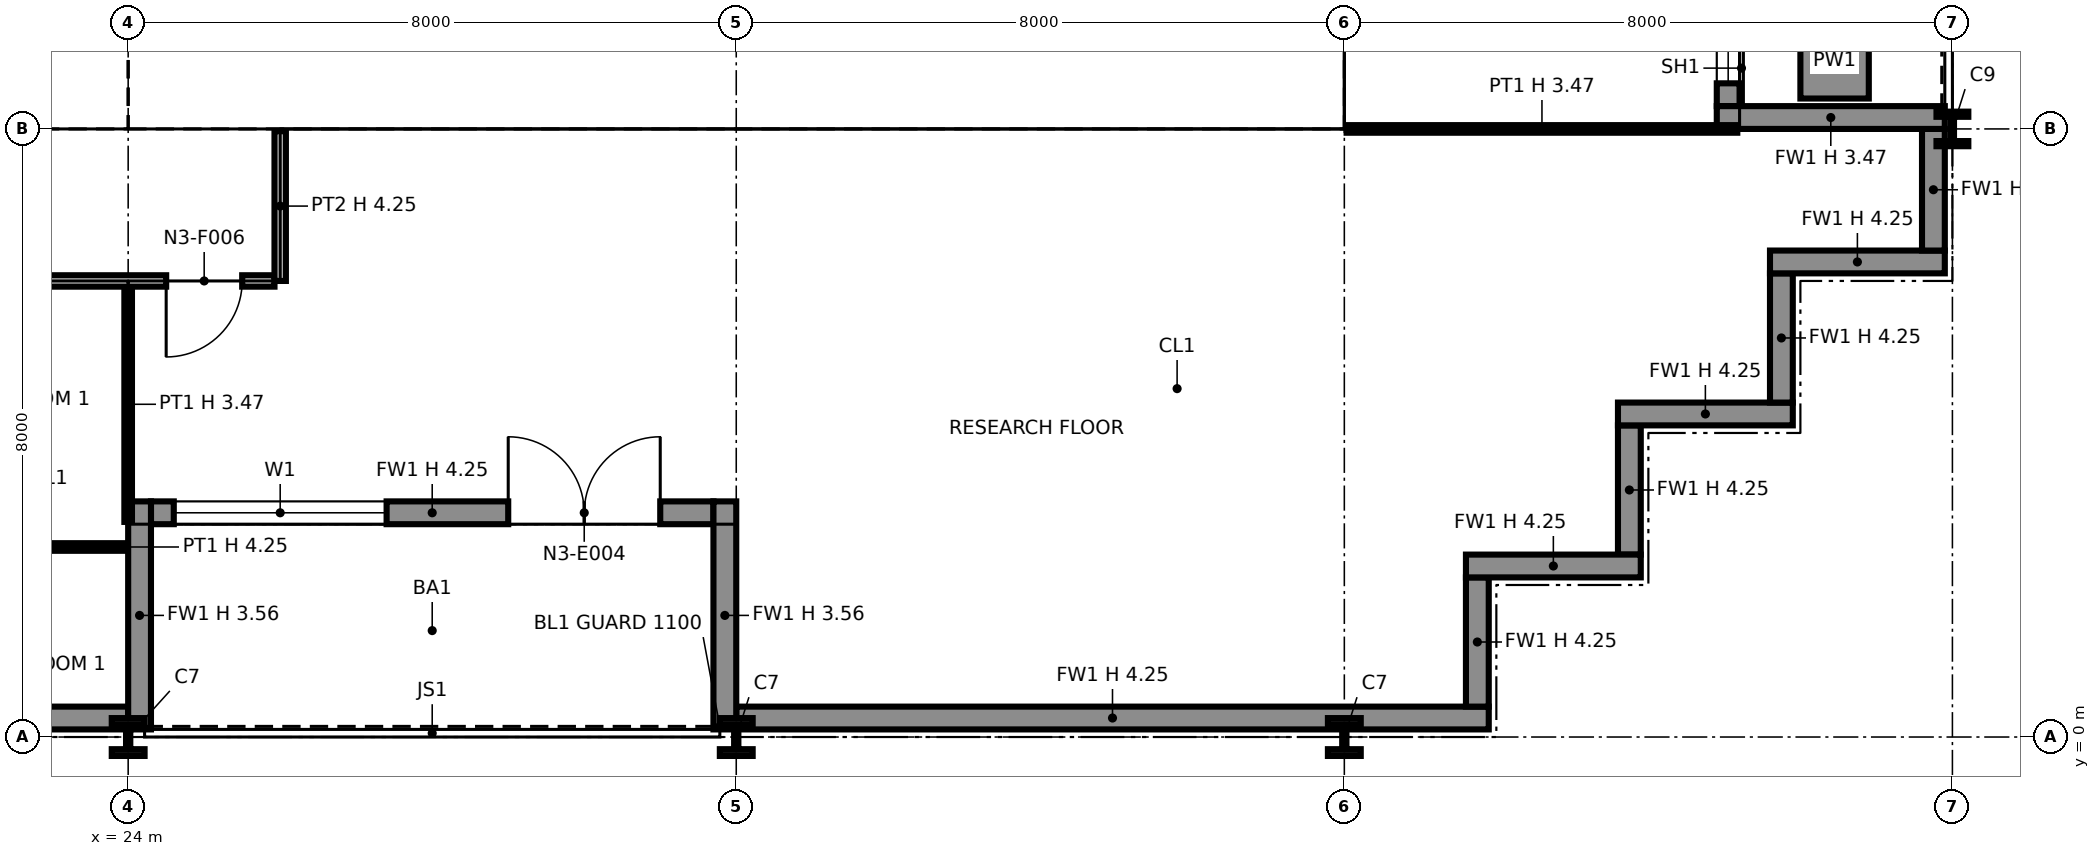
"""IFC4 building model, lengths in metres.
Left out: names, types, materials, properties, quantities, classifications, styles, units other than length and angle.
Written with IfcOpenShell. Run it as: python <this file> out.ifc"""

import sys

from ifc_helpers import new_model, si_unit, direction, frame, frame_2d, origin, origin_2d, place, context, subcontext, project, spatial, polyline, rectangle, i_section, outline, extrude, element, fill, save


model = new_model("IFC4")
c1 = context("Model", 3, precision=1e-05, world=origin(), true_north=direction((0.0, 1.0)))
c2 = subcontext(c1, "Body", "Model", "MODEL_VIEW")
j1 = project(units=[si_unit("LENGTHUNIT", "METRE"), si_unit("PLANEANGLEUNIT", "RADIAN")], contexts=[c1])
p1 = place(None, origin())
s1 = spatial("IfcSite", under=j1, at=p1, CompositionType="ELEMENT")
p2 = place(p1, origin())
s2 = spatial("IfcBuilding", under=s1, at=p2, CompositionType="ELEMENT")
p3 = place(p2, frame((0.0, 0.0, 65.6)))
s3 = spatial("IfcBuildingStorey", under=s2, at=p3, CompositionType="ELEMENT", Elevation=65.6)
p4 = place(p3, frame((24.0, 0.0, 0.0), z_axis=(0.0, 0.0, 1.0), x_axis=(1.0, 0.0, 0.0)))
e1 = element("IfcColumn", 1, at=p4, inside=s3, PredefinedType="COLUMN", context=c2, shape_type="SweptSolid", body=[
    extrude(i_section(OverallWidth=0.432, OverallDepth=0.498, WebThickness=0.056, FlangeThickness=0.089, at=origin_2d()), origin(), (0.0, 0.0, 1.0), 4.25),
])
p5 = place(p3, frame((24.0, 8.0, 0.0), z_axis=(0.0, 0.0, 1.0), x_axis=(1.0, 0.0, 0.0)))
e2 = element("IfcColumn", 2, at=p5, inside=s3, PredefinedType="COLUMN", context=c2, shape_type="SweptSolid", body=[
    extrude(i_section(OverallWidth=0.411, OverallDepth=0.434, WebThickness=0.036, FlangeThickness=0.057, at=origin_2d()), origin(), (0.0, 0.0, 1.0), 4.25),
])
p6 = place(p3, frame((32.0, 0.0, 0.0), z_axis=(0.0, 0.0, 1.0), x_axis=(1.0, 0.0, 0.0)))
e3 = element("IfcColumn", 3, at=p6, inside=s3, PredefinedType="COLUMN", context=c2, shape_type="SweptSolid", body=[
    extrude(i_section(OverallWidth=0.432, OverallDepth=0.498, WebThickness=0.056, FlangeThickness=0.089, at=origin_2d()), origin(), (0.0, 0.0, 1.0), 4.25),
])
p7 = place(p3, frame((32.0, 8.0, 0.0), z_axis=(0.0, 0.0, 1.0), x_axis=(1.0, 0.0, 0.0)))
e4 = element("IfcColumn", 4, at=p7, inside=s3, PredefinedType="COLUMN", context=c2, shape_type="SweptSolid", body=[
    extrude(i_section(OverallWidth=0.406, OverallDepth=0.417, WebThickness=0.03, FlangeThickness=0.048, at=origin_2d()), origin(), (0.0, 0.0, 1.0), 4.25),
])
p8 = place(p3, frame((40.0, 0.0, 0.0), z_axis=(0.0, 0.0, 1.0), x_axis=(1.0, 0.0, 0.0)))
e5 = element("IfcColumn", 5, at=p8, inside=s3, PredefinedType="COLUMN", context=c2, shape_type="SweptSolid", body=[
    extrude(i_section(OverallWidth=0.432, OverallDepth=0.498, WebThickness=0.056, FlangeThickness=0.089, at=origin_2d()), origin(), (0.0, 0.0, 1.0), 4.25),
])
p9 = place(p3, frame((40.0, 8.0, 0.0), z_axis=(0.0, 0.0, 1.0), x_axis=(1.0, 0.0, 0.0)))
e6 = element("IfcColumn", 6, at=p9, inside=s3, PredefinedType="COLUMN", context=c2, shape_type="SweptSolid", body=[
    extrude(i_section(OverallWidth=0.406, OverallDepth=0.417, WebThickness=0.03, FlangeThickness=0.048, at=origin_2d()), origin(), (0.0, 0.0, 1.0), 4.25),
])
p10 = place(p3, frame((48.0, 8.0, 0.0), z_axis=(0.0, 0.0, 1.0), x_axis=(1.0, 0.0, 0.0)))
e7 = element("IfcColumn", 7, at=p10, inside=s3, PredefinedType="COLUMN", context=c2, shape_type="SweptSolid", body=[
    extrude(i_section(OverallWidth=0.419, OverallDepth=0.455, WebThickness=0.042, FlangeThickness=0.068, at=origin_2d()), origin(), (0.0, 0.0, 1.0), 4.25),
])
p11 = place(p3, frame((16.0, 0.25, 0.0), z_axis=(0.0, 0.0, 1.0), x_axis=(1.0, 0.0, 0.0)))
e8 = element("IfcWall", 8, at=p11, inside=s3, PredefinedType="SOLIDWALL", context=c2, shape_type="SweptSolid", body=[
    extrude(rectangle(XDim=8.0, YDim=0.3, at=frame_2d((4.0, 0.0))), origin(), (0.0, 0.0, 1.0), 4.25),
])
p12 = place(p3, frame((24.3, 2.95, 0.0), z_axis=(0.0, 0.0, 1.0), x_axis=(1.0, 0.0, 0.0)))
e9 = element("IfcWall", 9, at=p12, inside=s3, PredefinedType="SOLIDWALL", context=c2, shape_type="SweptSolid", body=[
    extrude(rectangle(XDim=7.4, YDim=0.3, at=frame_2d((3.7, 0.0))), origin(), (0.0, 0.0, 1.0), 4.25),
])
p13 = place(p12, frame((0.3, 0.0, 0.9)))
e10 = element("IfcOpeningElement", 10, at=p13, cuts=e9, PredefinedType="OPENING", context=c2, shape_type="SweptSolid", body=[
    extrude(rectangle(XDim=2.8, YDim=2.2, at=frame_2d((1.4, 1.1))), frame((0.0, 0.16, 0.0), z_axis=(0.0, -1.0, 0.0), x_axis=(1.0, 0.0, 0.0)), (0.0, 0.0, 1.0), 0.32),
])
p14 = place(p12, frame((4.7, 0.0, 0.0)))
e11 = element("IfcOpeningElement", 11, at=p14, cuts=e9, PredefinedType="OPENING", context=c2, shape_type="SweptSolid", body=[
    extrude(rectangle(XDim=2.0, YDim=2.4, at=frame_2d((1.0, 1.2))), frame((0.0, 0.16, 0.0), z_axis=(0.0, -1.0, 0.0), x_axis=(1.0, 0.0, 0.0)), (0.0, 0.0, 1.0), 0.32),
])
for number, where, z_axis, x_axis in (
    (12, (24.15, 0.1, 0.0), (0.0, 0.0, 1.0), (0.0, 1.0, 0.0)),
    (13, (31.85, 0.1, 0.0), (0.0, 0.0, 1.0), (0.0, 1.0, 0.0)),
):
    element("IfcWall", number, at=place(p3, frame(where, z_axis=z_axis, x_axis=x_axis)), inside=s3, PredefinedType="SOLIDWALL", context=c2, shape_type="SweptSolid", body=[
        extrude(rectangle(XDim=3.0, YDim=0.3, at=frame_2d((1.5, 0.0))), origin(), (0.0, 0.0, 1.0), 3.556),
    ])
p15 = place(p3, frame((32.0, 0.25, 0.0), z_axis=(0.0, 0.0, 1.0), x_axis=(1.0, 0.0, 0.0)))
e14 = element("IfcWall", 14, at=p15, inside=s3, PredefinedType="SOLIDWALL", context=c2, shape_type="SweptSolid", body=[
    extrude(rectangle(XDim=9.9, YDim=0.3, at=frame_2d((4.95, 0.0))), origin(), (0.0, 0.0, 1.0), 4.25),
])
p16 = place(p3, frame((41.75, 0.4, 0.0), z_axis=(0.0, 0.0, 1.0), x_axis=(0.0, 1.0, 0.0)))
e15 = element("IfcWall", 15, at=p16, inside=s3, PredefinedType="SOLIDWALL", context=c2, shape_type="SweptSolid", body=[
    extrude(rectangle(XDim=1.7, YDim=0.3, at=frame_2d((0.85, 0.0))), origin(), (0.0, 0.0, 1.0), 4.25),
])
p17 = place(p3, frame((41.6, 2.25, 0.0), z_axis=(0.0, 0.0, 1.0), x_axis=(1.0, 0.0, 0.0)))
e16 = element("IfcWall", 16, at=p17, inside=s3, PredefinedType="SOLIDWALL", context=c2, shape_type="SweptSolid", body=[
    extrude(rectangle(XDim=2.3, YDim=0.3, at=frame_2d((1.15, 0.0))), origin(), (0.0, 0.0, 1.0), 4.25),
])
p18 = place(p3, frame((43.75, 2.4, 0.0), z_axis=(0.0, 0.0, 1.0), x_axis=(0.0, 1.0, 0.0)))
e17 = element("IfcWall", 17, at=p18, inside=s3, PredefinedType="SOLIDWALL", context=c2, shape_type="SweptSolid", body=[
    extrude(rectangle(XDim=1.7, YDim=0.3, at=frame_2d((0.85, 0.0))), origin(), (0.0, 0.0, 1.0), 4.25),
])
p19 = place(p3, frame((43.6, 4.25, 0.0), z_axis=(0.0, 0.0, 1.0), x_axis=(1.0, 0.0, 0.0)))
e18 = element("IfcWall", 18, at=p19, inside=s3, PredefinedType="SOLIDWALL", context=c2, shape_type="SweptSolid", body=[
    extrude(rectangle(XDim=2.3, YDim=0.3, at=frame_2d((1.15, 0.0))), origin(), (0.0, 0.0, 1.0), 4.25),
])
p20 = place(p3, frame((45.75, 4.4, 0.0), z_axis=(0.0, 0.0, 1.0), x_axis=(0.0, 1.0, 0.0)))
e19 = element("IfcWall", 19, at=p20, inside=s3, PredefinedType="SOLIDWALL", context=c2, shape_type="SweptSolid", body=[
    extrude(rectangle(XDim=1.7, YDim=0.3, at=frame_2d((0.85, 0.0))), origin(), (0.0, 0.0, 1.0), 4.25),
])
p21 = place(p3, frame((45.6, 6.25, 0.0), z_axis=(0.0, 0.0, 1.0), x_axis=(1.0, 0.0, 0.0)))
e20 = element("IfcWall", 20, at=p21, inside=s3, PredefinedType="SOLIDWALL", context=c2, shape_type="SweptSolid", body=[
    extrude(rectangle(XDim=2.3, YDim=0.3, at=frame_2d((1.15, 0.0))), origin(), (0.0, 0.0, 1.0), 4.25),
])
p22 = place(p3, frame((47.75, 6.4, 0.0), z_axis=(0.0, 0.0, 1.0), x_axis=(0.0, 1.0, 0.0)))
e21 = element("IfcWall", 21, at=p22, inside=s3, PredefinedType="SOLIDWALL", context=c2, shape_type="SweptSolid", body=[
    extrude(rectangle(XDim=1.6, YDim=0.3, at=frame_2d((0.8, 0.0))), origin(), (0.0, 0.0, 1.0), 4.25),
])
p23 = place(p3, frame((45.05, 8.3, 0.0), z_axis=(0.0, 0.0, 1.0), x_axis=(0.0, 1.0, 0.0)))
e22 = element("IfcWall", 22, at=p23, inside=s3, PredefinedType="SOLIDWALL", context=c2, shape_type="SweptSolid", body=[
    extrude(rectangle(XDim=7.4, YDim=0.3, at=frame_2d((3.7, 0.0))), origin(), (0.0, 0.0, 1.0), 4.25),
])
p24 = place(p23, frame((0.3, 0.0, 0.9)))
e23 = element("IfcOpeningElement", 23, at=p24, cuts=e22, PredefinedType="OPENING", context=c2, shape_type="SweptSolid", body=[
    extrude(rectangle(XDim=2.8, YDim=2.2, at=frame_2d((1.4, 1.1))), frame((0.0, 0.16, 0.0), z_axis=(0.0, -1.0, 0.0), x_axis=(1.0, 0.0, 0.0)), (0.0, 0.0, 1.0), 0.32),
])
p25 = place(p23, frame((4.7, 0.0, 0.0)))
e24 = element("IfcOpeningElement", 24, at=p25, cuts=e22, PredefinedType="OPENING", context=c2, shape_type="SweptSolid", body=[
    extrude(rectangle(XDim=2.0, YDim=2.4, at=frame_2d((1.0, 1.2))), frame((0.0, 0.16, 0.0), z_axis=(0.0, -1.0, 0.0), x_axis=(1.0, 0.0, 0.0)), (0.0, 0.0, 1.0), 0.32),
])
p26 = place(p3, frame((47.9, 8.15, 0.0), z_axis=(0.0, 0.0, 1.0), x_axis=(-1.0, 0.0, 0.0)))
e25 = element("IfcWall", 25, at=p26, inside=s3, PredefinedType="SOLIDWALL", context=c2, shape_type="SweptSolid", body=[
    extrude(rectangle(XDim=3.0, YDim=0.3, at=frame_2d((1.5, 0.0))), origin(), (0.0, 0.0, 1.0), 3.469),
])
p27 = place(p3, frame((46.45, 8.4, 0.0), z_axis=(0.0, 0.0, 1.0), x_axis=(0.0, 1.0, 0.0)))
e26 = element("IfcWall", 26, at=p27, inside=s3, PredefinedType="SOLIDWALL", context=c2, shape_type="SweptSolid", body=[
    extrude(rectangle(XDim=3.2, YDim=0.9, at=frame_2d((1.6, 0.0))), origin(), (0.0, 0.0, 1.0), 0.6),
])
p28 = place(p3, frame((8.65, 8.75, 0.0), z_axis=(0.0, 0.0, 1.0), x_axis=(1.0, 0.0, 0.0)))
e27 = element("IfcWall", 27, at=p28, inside=s3, PredefinedType="PARTITIONING", context=c2, shape_type="SweptSolid", body=[
    extrude(outline(polyline([(0.0, 0.0), (14.7, 0.0), (14.7, 4.25), (7.469, 4.25), (7.469, 3.632), (7.231, 3.632), (7.23, 4.25), (0.0, 4.25), (0.0, 0.0)])), frame((0.0, 0.1, 0.0), z_axis=(0.0, -1.0, 0.0), x_axis=(1.0, 0.0, 0.0)), (0.0, 0.0, 1.0), 0.2),
])
p29 = place(p28, frame((1.3, 0.0, 0.0)))
e28 = element("IfcOpeningElement", 28, at=p29, cuts=e27, PredefinedType="OPENING", context=c2, shape_type="SweptSolid", body=[
    extrude(rectangle(XDim=1.4, YDim=2.1, at=frame_2d((0.7, 1.05))), frame((0.0, 0.11, 0.0), z_axis=(0.0, -1.0, 0.0), x_axis=(1.0, 0.0, 0.0)), (0.0, 0.0, 1.0), 0.22),
])
p30 = place(p28, frame((4.6, 0.0, 0.0)))
e29 = element("IfcOpeningElement", 29, at=p30, cuts=e27, PredefinedType="OPENING", context=c2, shape_type="SweptSolid", body=[
    extrude(rectangle(XDim=1.4, YDim=2.1, at=frame_2d((0.7, 1.05))), frame((0.0, 0.11, 0.0), z_axis=(0.0, -1.0, 0.0), x_axis=(1.0, 0.0, 0.0)), (0.0, 0.0, 1.0), 0.22),
])
p31 = place(p28, frame((10.4, 0.0, 0.0)))
e30 = element("IfcOpeningElement", 30, at=p31, cuts=e27, PredefinedType="OPENING", context=c2, shape_type="SweptSolid", body=[
    extrude(rectangle(XDim=1.2, YDim=2.1, at=frame_2d((0.6, 1.05))), frame((0.0, 0.11, 0.0), z_axis=(0.0, -1.0, 0.0), x_axis=(1.0, 0.0, 0.0)), (0.0, 0.0, 1.0), 0.22),
])
p32 = place(p3, frame((23.25, 8.85, 0.0), z_axis=(0.0, 0.0, 1.0), x_axis=(0.0, 1.0, 0.0)))
e31 = element("IfcWall", 31, at=p32, inside=s3, PredefinedType="PARTITIONING", context=c2, shape_type="SweptSolid", body=[
    extrude(outline(polyline([(0.0, 0.0), (14.3, 0.0), (14.3, 4.25), (11.231, 4.25), (11.23, 3.789), (11.07, 3.789), (11.069, 4.25), (7.27, 4.25), (7.269, 3.632), (7.031, 3.632), (7.031, 4.25), (1.231, 4.25), (1.23, 3.789), (1.07, 3.789), (1.069, 4.25), (0.0, 4.25), (0.0, 0.0)])), frame((0.0, 0.1, 0.0), z_axis=(0.0, -1.0, 0.0), x_axis=(1.0, 0.0, 0.0)), (0.0, 0.0, 1.0), 0.2),
])
p33 = place(p32, frame((8.3, 0.0, 0.0)))
e32 = element("IfcOpeningElement", 32, at=p33, cuts=e31, PredefinedType="OPENING", context=c2, shape_type="SweptSolid", body=[
    extrude(rectangle(XDim=1.8, YDim=2.1, at=frame_2d((0.9, 1.05))), frame((0.0, 0.11, 0.0), z_axis=(0.0, -1.0, 0.0), x_axis=(1.0, 0.0, 0.0)), (0.0, 0.0, 1.0), 0.22),
])
p34 = place(p3, frame((24.65, 8.75, 0.0), z_axis=(0.0, 0.0, 1.0), x_axis=(1.0, 0.0, 0.0)))
e33 = element("IfcWall", 33, at=p34, inside=s3, PredefinedType="PARTITIONING", context=c2, shape_type="SweptSolid", body=[
    extrude(outline(polyline([(0.0, 0.0), (14.7, 0.0), (14.7, 4.25), (7.469, 4.25), (7.469, 3.632), (7.231, 3.632), (7.23, 4.25), (0.0, 4.25), (0.0, 0.0)])), frame((0.0, 0.1, 0.0), z_axis=(0.0, -1.0, 0.0), x_axis=(1.0, 0.0, 0.0)), (0.0, 0.0, 1.0), 0.2),
])
p35 = place(p3, frame((24.75, 8.85, 0.0), z_axis=(0.0, 0.0, 1.0), x_axis=(0.0, 1.0, 0.0)))
e34 = element("IfcWall", 34, at=p35, inside=s3, PredefinedType="PARTITIONING", context=c2, shape_type="SweptSolid", body=[
    extrude(outline(polyline([(0.0, 0.0), (6.3, 0.0), (6.3, 4.25), (3.231, 4.25), (3.23, 3.789), (3.07, 3.789), (3.069, 4.25), (0.0, 4.25), (0.0, 0.0)])), frame((0.0, 0.1, 0.0), z_axis=(0.0, -1.0, 0.0), x_axis=(1.0, 0.0, 0.0)), (0.0, 0.0, 1.0), 0.2),
])
for number, where, z_axis, x_axis in (
    (35, (27.075, 8.85, 0.0), (0.0, 0.0, 1.0), (0.0, 1.0, 0.0)),
    (36, (29.225, 8.85, 0.0), (0.0, 0.0, 1.0), (0.0, 1.0, 0.0)),
):
    element("IfcWall", number, at=place(p3, frame(where, z_axis=z_axis, x_axis=x_axis)), inside=s3, PredefinedType="PARTITIONING", context=c2, shape_type="SweptSolid", body=[
        extrude(rectangle(XDim=3.0, YDim=0.15, at=frame_2d((1.5, 0.0))), origin(), (0.0, 0.0, 1.0), 4.25),
    ])
p36 = place(p3, frame((32.0, 8.85, 0.0), z_axis=(0.0, 0.0, 1.0), x_axis=(0.0, 1.0, 0.0)))
e37 = element("IfcWall", 37, at=p36, inside=s3, PredefinedType="PARTITIONING", context=c2, shape_type="SweptSolid", body=[
    extrude(rectangle(XDim=3.0, YDim=0.6, at=frame_2d((1.5, 0.0))), origin(), (0.0, 0.0, 1.0), 3.632),
])
for number, where, z_axis, x_axis in (
    (38, (35.6, 8.85, 0.0), (0.0, 0.0, 1.0), (0.0, 1.0, 0.0)),
    (39, (39.25, 8.85, 0.0), (0.0, 0.0, 1.0), (0.0, 1.0, 0.0)),
):
    element("IfcWall", number, at=place(p3, frame(where, z_axis=z_axis, x_axis=x_axis)), inside=s3, PredefinedType="PARTITIONING", context=c2, shape_type="SweptSolid", body=[
        extrude(rectangle(XDim=6.3, YDim=0.2, at=frame_2d((3.15, 0.0))), origin(), (0.0, 0.0, 1.0), 4.25),
    ])
p37 = place(p3, frame((20.05, 2.5, 0.0), z_axis=(0.0, 0.0, 1.0), x_axis=(1.0, 0.0, 0.0)))
e40 = element("IfcWall", 40, at=p37, inside=s3, PredefinedType="PARTITIONING", context=c2, shape_type="SweptSolid", body=[
    extrude(rectangle(XDim=3.92, YDim=0.1, at=frame_2d((1.96, 0.0))), origin(), (0.0, 0.0, 1.0), 4.25),
])
p38 = place(p37, frame((1.45, 0.0, 0.0)))
e41 = element("IfcOpeningElement", 41, at=p38, cuts=e40, PredefinedType="OPENING", context=c2, shape_type="SweptSolid", body=[
    extrude(rectangle(XDim=1.0, YDim=2.1, at=frame_2d((0.5, 1.05))), frame((0.0, 0.06, 0.0), z_axis=(0.0, -1.0, 0.0), x_axis=(1.0, 0.0, 0.0)), (0.0, 0.0, 1.0), 0.12),
])
p39 = place(p3, frame((24.0, 2.83, 0.0), z_axis=(0.0, 0.0, 1.0), x_axis=(0.0, 1.0, 0.0)))
e42 = element("IfcWall", 42, at=p39, inside=s3, PredefinedType="PARTITIONING", context=c2, shape_type="SweptSolid", body=[
    extrude(rectangle(XDim=3.095, YDim=0.1, at=frame_2d((1.547, 0.0))), origin(), (0.0, 0.0, 1.0), 3.47),
])
p40 = place(p3, frame((6.075, 6.0, 0.0), z_axis=(0.0, 0.0, 1.0), x_axis=(1.0, 0.0, 0.0)))
e43 = element("IfcWall", 43, at=p40, inside=s3, PredefinedType="PARTITIONING", context=c2, shape_type="SweptSolid", body=[
    extrude(rectangle(XDim=19.85, YDim=0.15, at=frame_2d((9.925, 0.0))), origin(), (0.0, 0.0, 1.0), 4.25),
])
p41 = place(p40, frame((12.425, 0.0, 0.0), z_axis=(0.0, 0.0, 1.0), x_axis=(-1.0, 0.0, 0.0)))
e44 = element("IfcOpeningElement", 44, at=p41, cuts=e43, PredefinedType="OPENING", context=c2, shape_type="SweptSolid", body=[
    extrude(rectangle(XDim=1.0, YDim=2.1, at=frame_2d((0.5, 1.05))), frame((0.0, 0.085, 0.0), z_axis=(0.0, -1.0, 0.0), x_axis=(1.0, 0.0, 0.0)), (0.0, 0.0, 1.0), 0.17),
])
p42 = place(p40, frame((16.425, 0.0, 0.0), z_axis=(0.0, 0.0, 1.0), x_axis=(-1.0, 0.0, 0.0)))
e45 = element("IfcOpeningElement", 45, at=p42, cuts=e43, PredefinedType="OPENING", context=c2, shape_type="SweptSolid", body=[
    extrude(rectangle(XDim=1.0, YDim=2.1, at=frame_2d((0.5, 1.05))), frame((0.0, 0.085, 0.0), z_axis=(0.0, -1.0, 0.0), x_axis=(1.0, 0.0, 0.0)), (0.0, 0.0, 1.0), 0.17),
])
p43 = place(p40, frame((4.425, 0.0, 0.0), z_axis=(0.0, 0.0, 1.0), x_axis=(-1.0, 0.0, 0.0)))
e46 = element("IfcOpeningElement", 46, at=p43, cuts=e43, PredefinedType="OPENING", context=c2, shape_type="SweptSolid", body=[
    extrude(rectangle(XDim=1.0, YDim=2.1, at=frame_2d((0.5, 1.05))), frame((0.0, 0.085, 0.0), z_axis=(0.0, -1.0, 0.0), x_axis=(1.0, 0.0, 0.0)), (0.0, 0.0, 1.0), 0.17),
])
p44 = place(p40, frame((8.425, 0.0, 0.0), z_axis=(0.0, 0.0, 1.0), x_axis=(-1.0, 0.0, 0.0)))
e47 = element("IfcOpeningElement", 47, at=p44, cuts=e43, PredefinedType="OPENING", context=c2, shape_type="SweptSolid", body=[
    extrude(rectangle(XDim=1.0, YDim=2.1, at=frame_2d((0.5, 1.05))), frame((0.0, 0.085, 0.0), z_axis=(0.0, -1.0, 0.0), x_axis=(1.0, 0.0, 0.0)), (0.0, 0.0, 1.0), 0.17),
])
p45 = place(p40, frame((19.425, 0.0, 0.0), z_axis=(0.0, 0.0, 1.0), x_axis=(-1.0, 0.0, 0.0)))
e48 = element("IfcOpeningElement", 48, at=p45, cuts=e43, PredefinedType="OPENING", context=c2, shape_type="SweptSolid", body=[
    extrude(rectangle(XDim=1.0, YDim=2.1, at=frame_2d((0.5, 1.05))), frame((0.0, 0.085, 0.0), z_axis=(0.0, -1.0, 0.0), x_axis=(1.0, 0.0, 0.0)), (0.0, 0.0, 1.0), 0.17),
])
p46 = place(p3, frame((26.0, 6.0, 0.0), z_axis=(0.0, 0.0, 1.0), x_axis=(0.0, 1.0, 0.0)))
e49 = element("IfcWall", 49, at=p46, inside=s3, PredefinedType="PARTITIONING", context=c2, shape_type="SweptSolid", body=[
    extrude(rectangle(XDim=1.97, YDim=0.15, at=frame_2d((0.985, 0.0))), origin(), (0.0, 0.0, 1.0), 4.25),
])
p47 = place(p3, frame((40.03, 8.0, 0.0), z_axis=(0.0, 0.0, 1.0), x_axis=(1.0, 0.0, 0.0)))
e50 = element("IfcWall", 50, at=p47, inside=s3, PredefinedType="PARTITIONING", context=c2, shape_type="SweptSolid", body=[
    extrude(rectangle(XDim=5.14, YDim=0.1, at=frame_2d((2.57, 0.0))), origin(), (0.0, 0.0, 1.0), 3.47),
])
p48 = place(p13, origin())
e51 = element("IfcWindow", 51, at=p48, inside=s3, PartitioningType="SINGLE_PANEL", PredefinedType="WINDOW", context=c2, shape_type="SweptSolid", body=[
    extrude(rectangle(XDim=2.8, YDim=2.2, at=frame_2d((1.4, 1.1))), frame((0.0, 0.03, 0.0), z_axis=(0.0, -1.0, 0.0), x_axis=(1.0, 0.0, 0.0)), (0.0, 0.0, 1.0), 0.06),
])
fill(e10, e51)
p49 = place(p14, origin())
e52 = element("IfcDoor", 52, at=p49, inside=s3, OperationType="DOUBLE_DOOR_SINGLE_SWING", PredefinedType="DOOR", context=c2, shape_type="SweptSolid", body=[
    extrude(rectangle(XDim=2.0, YDim=2.4, at=frame_2d((1.0, 1.2))), frame((0.0, 0.025, 0.0), z_axis=(0.0, -1.0, 0.0), x_axis=(1.0, 0.0, 0.0)), (0.0, 0.0, 1.0), 0.05),
])
fill(e11, e52)
p50 = place(p24, origin())
e53 = element("IfcWindow", 53, at=p50, inside=s3, PartitioningType="SINGLE_PANEL", PredefinedType="WINDOW", context=c2, shape_type="SweptSolid", body=[
    extrude(rectangle(XDim=2.8, YDim=2.2, at=frame_2d((1.4, 1.1))), frame((0.0, 0.03, 0.0), z_axis=(0.0, -1.0, 0.0), x_axis=(1.0, 0.0, 0.0)), (0.0, 0.0, 1.0), 0.06),
])
fill(e23, e53)
p51 = place(p45, origin())
e54 = element("IfcDoor", 54, at=p51, inside=s3, OperationType="SINGLE_SWING_RIGHT", PredefinedType="DOOR", context=c2, shape_type="SweptSolid", body=[
    extrude(rectangle(XDim=1.0, YDim=2.1, at=frame_2d((0.5, 1.05))), frame((0.0, 0.025, 0.0), z_axis=(0.0, -1.0, 0.0), x_axis=(1.0, 0.0, 0.0)), (0.0, 0.0, 1.0), 0.05),
])
fill(e48, e54)
save(model, sys.argv[1])
